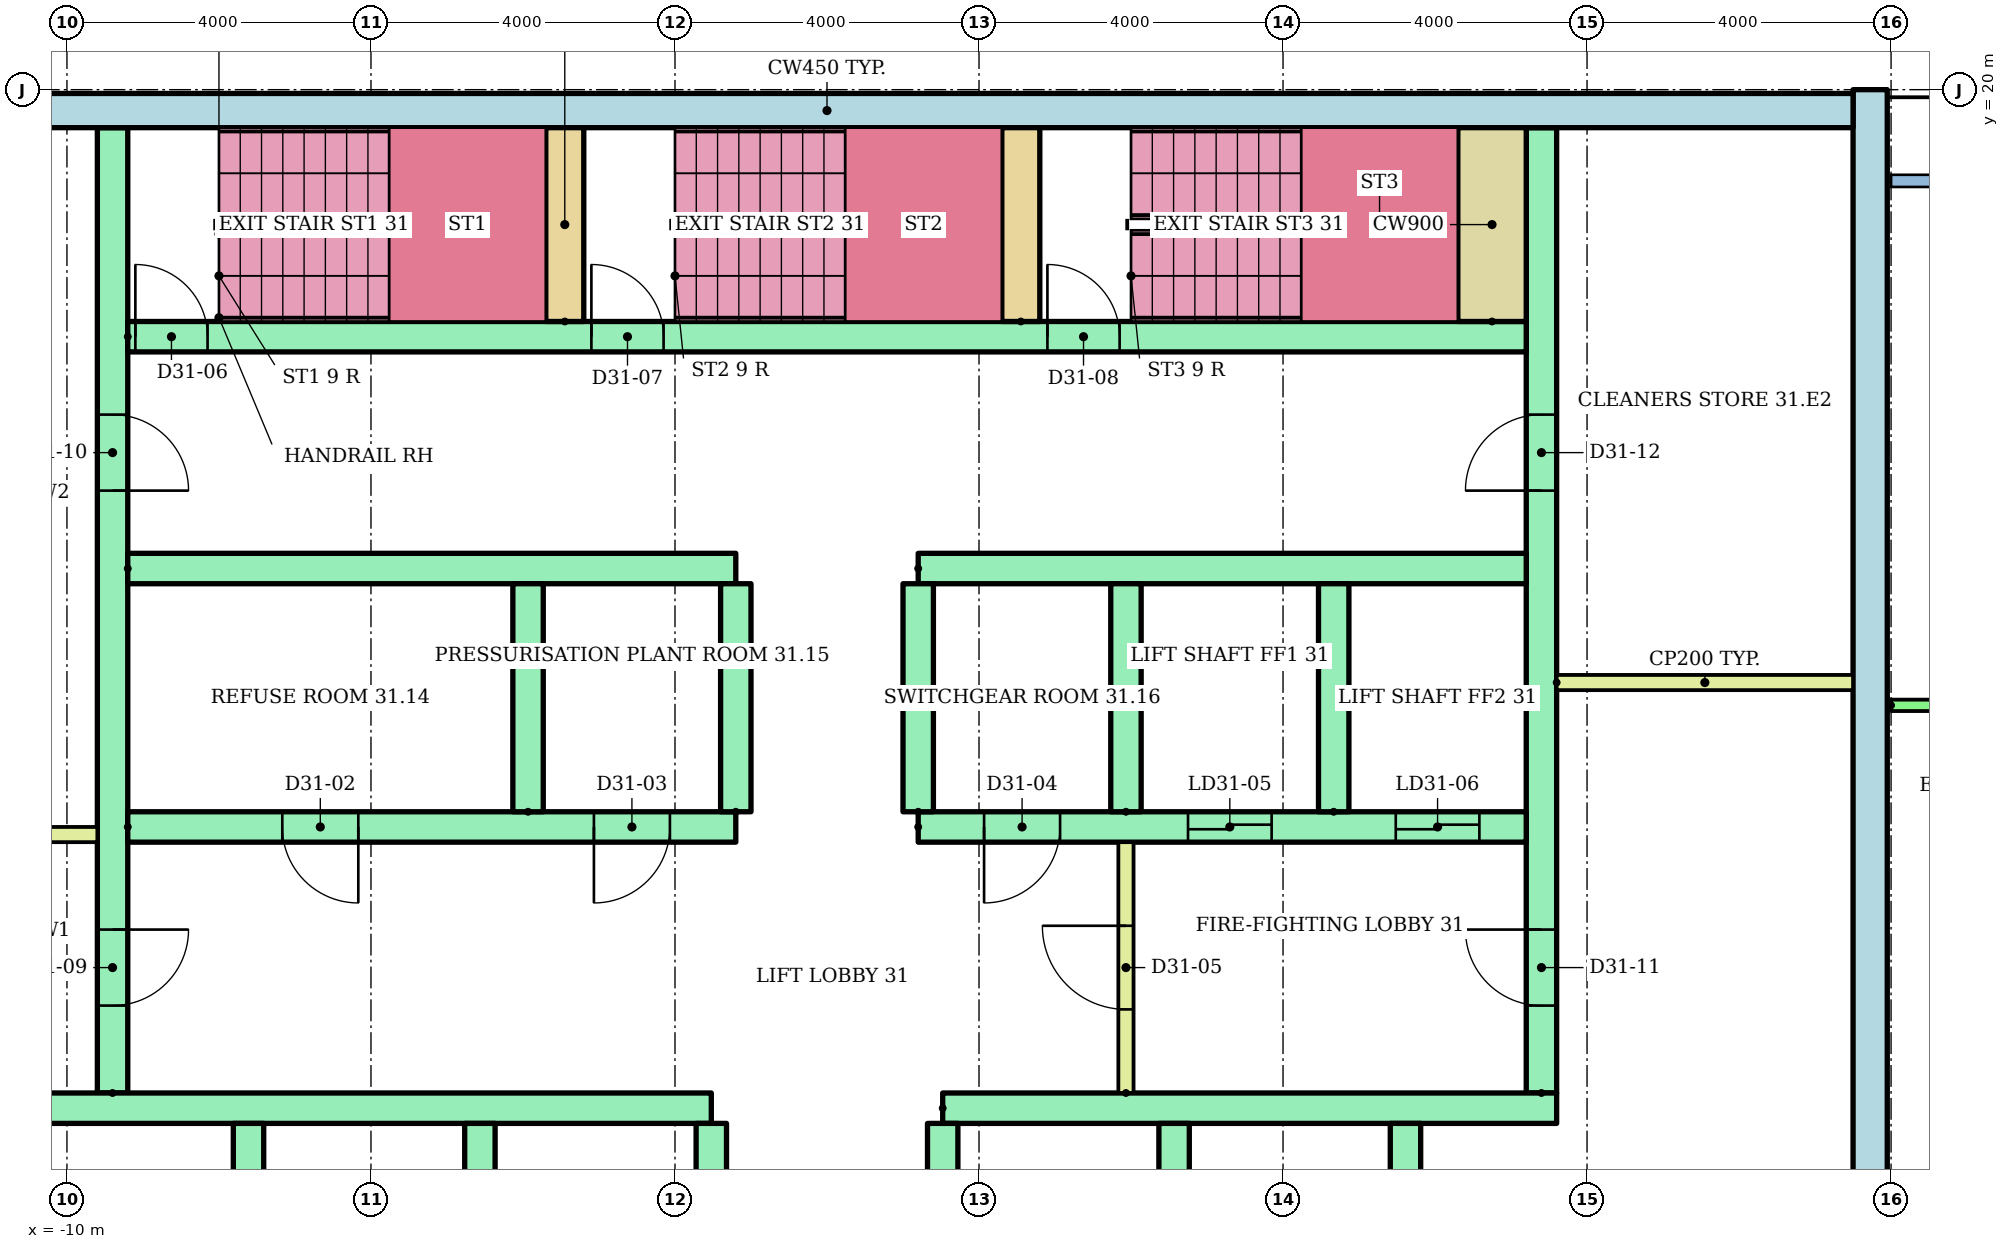
"""IFC4 building model, lengths in metres.
Left out: names, types, materials, properties, quantities, classifications, styles, units other than length and angle.
Written with IfcOpenShell. Run it as: python <this file> out.ifc"""

import sys

from ifc_helpers import new_model, si_unit, direction, frame, frame_2d, origin, place, context, subcontext, project, spatial, rectangle, extrude, element, fill, save


model = new_model("IFC4")
c1 = context("Model", 3, precision=1e-05, world=origin(), true_north=direction((0.0, 1.0)))
c2 = subcontext(c1, "Body", "Model", "MODEL_VIEW")
j1 = project(units=[si_unit("LENGTHUNIT", "METRE"), si_unit("PLANEANGLEUNIT", "RADIAN")], contexts=[c1])
p1 = place(None, origin())
s1 = spatial("IfcSite", under=j1, at=p1, CompositionType="ELEMENT")
p2 = place(p1, origin())
s2 = spatial("IfcBuilding", under=s1, at=p2, CompositionType="ELEMENT")
p3 = place(p2, frame((0.0, 0.0, 123.0)))
s3 = spatial("IfcBuildingStorey", under=s2, at=p3, CompositionType="ELEMENT", Elevation=123.0)
p4 = place(p3, frame((13.725, 3.0, 0.0), z_axis=(0.0, 0.0, 1.0), x_axis=(0.0, 1.0, 0.0)))
e1 = element("IfcWall", 1, at=p4, inside=s3, PredefinedType="SHEAR", context=c2, shape_type="SweptSolid", body=[
    extrude(rectangle(XDim=17.0, YDim=0.45, at=frame_2d((8.5, 0.0))), origin(), (0.0, 0.0, 1.0), 2.92),
])
p5 = place(p3, frame((-13.5, 19.725, 0.0)))
e2 = element("IfcWall", 2, at=p5, inside=s3, PredefinedType="SHEAR", context=c2, shape_type="SweptSolid", body=[
    extrude(rectangle(XDim=27.0, YDim=0.45, at=frame_2d((13.5, 0.0))), origin(), (0.0, 0.0, 1.0), 2.92),
])
p6 = place(p3, frame((-9.4, 6.8, 0.0), z_axis=(0.0, 0.0, 1.0), x_axis=(0.0, 1.0, 0.0)))
e3 = element("IfcWall", 3, at=p6, inside=s3, PredefinedType="SHEAR", context=c2, shape_type="SweptSolid", body=[
    extrude(rectangle(XDim=12.7, YDim=0.4, at=frame_2d((6.35, 0.0))), origin(), (0.0, 0.0, 1.0), 2.92),
])
p7 = place(p6, frame((1.15, 0.0, 0.0)))
e4 = element("IfcOpeningElement", 4, at=p7, cuts=e3, PredefinedType="OPENING", context=c2, shape_type="SweptSolid", body=[
    extrude(rectangle(XDim=1.0, YDim=2.1, at=frame_2d((0.5, 1.05))), frame((0.0, 0.21, 0.0), z_axis=(0.0, -1.0, 0.0), x_axis=(1.0, 0.0, 0.0)), (0.0, 0.0, 1.0), 0.42),
])
p8 = place(p6, frame((7.925, 0.0, 0.0)))
e5 = element("IfcOpeningElement", 5, at=p8, cuts=e3, PredefinedType="OPENING", context=c2, shape_type="SweptSolid", body=[
    extrude(rectangle(XDim=1.0, YDim=2.1, at=frame_2d((0.5, 1.05))), frame((0.0, 0.21, 0.0), z_axis=(0.0, -1.0, 0.0), x_axis=(1.0, 0.0, 0.0)), (0.0, 0.0, 1.0), 0.42),
])
p9 = place(p3, frame((9.4, 6.8, 0.0), z_axis=(0.0, 0.0, 1.0), x_axis=(0.0, 1.0, 0.0)))
e6 = element("IfcWall", 6, at=p9, inside=s3, PredefinedType="SHEAR", context=c2, shape_type="SweptSolid", body=[
    extrude(rectangle(XDim=12.7, YDim=0.4, at=frame_2d((6.35, 0.0))), origin(), (0.0, 0.0, 1.0), 2.92),
])
p10 = place(p9, frame((1.15, 0.0, 0.0)))
e7 = element("IfcOpeningElement", 7, at=p10, cuts=e6, PredefinedType="OPENING", context=c2, shape_type="SweptSolid", body=[
    extrude(rectangle(XDim=1.0, YDim=2.1, at=frame_2d((0.5, 1.05))), frame((0.0, 0.21, 0.0), z_axis=(0.0, -1.0, 0.0), x_axis=(1.0, 0.0, 0.0)), (0.0, 0.0, 1.0), 0.42),
])
p11 = place(p9, frame((7.925, 0.0, 0.0)))
e8 = element("IfcOpeningElement", 8, at=p11, cuts=e6, PredefinedType="OPENING", context=c2, shape_type="SweptSolid", body=[
    extrude(rectangle(XDim=1.0, YDim=2.1, at=frame_2d((0.5, 1.05))), frame((0.0, 0.21, 0.0), z_axis=(0.0, -1.0, 0.0), x_axis=(1.0, 0.0, 0.0)), (0.0, 0.0, 1.0), 0.42),
])
p12 = place(p3, frame((-13.5, 6.6, 0.0)))
e9 = element("IfcWall", 9, at=p12, inside=s3, PredefinedType="SHEAR", context=c2, shape_type="SweptSolid", body=[
    extrude(rectangle(XDim=11.978, YDim=0.4, at=frame_2d((5.989, 0.0))), origin(), (0.0, 0.0, 1.0), 2.92),
])
p13 = place(p3, frame((1.522, 6.6, 0.0)))
e10 = element("IfcWall", 10, at=p13, inside=s3, PredefinedType="SHEAR", context=c2, shape_type="SweptSolid", body=[
    extrude(rectangle(XDim=8.078, YDim=0.4, at=frame_2d((4.039, 0.0))), origin(), (0.0, 0.0, 1.0), 2.92),
])
for number, where, z_axis, x_axis in (
    (11, (-7.611, 3.4, 0.0), (0.0, 0.0, 1.0), (0.0, 1.0, 0.0)),
    (12, (-4.567, 3.4, 0.0), (0.0, 0.0, 1.0), (0.0, 1.0, 0.0)),
    (13, (-1.522, 3.4, 0.0), (0.0, 0.0, 1.0), (0.0, 1.0, 0.0)),
    (14, (1.522, 3.4, 0.0), (0.0, 0.0, 1.0), (0.0, 1.0, 0.0)),
    (15, (4.567, 3.4, 0.0), (0.0, 0.0, 1.0), (0.0, 1.0, 0.0)),
    (16, (7.611, 3.4, 0.0), (0.0, 0.0, 1.0), (0.0, 1.0, 0.0)),
):
    element("IfcWall", number, at=place(p3, frame(where, z_axis=z_axis, x_axis=x_axis)), inside=s3, PredefinedType="SHEAR", context=c2, shape_type="SweptSolid", body=[
        extrude(rectangle(XDim=3.0, YDim=0.4, at=frame_2d((1.5, 0.0))), origin(), (0.0, 0.0, 1.0), 2.92),
    ])
p14 = place(p3, frame((-9.2, 10.3, 0.0)))
e17 = element("IfcWall", 17, at=p14, inside=s3, PredefinedType="SHEAR", context=c2, shape_type="SweptSolid", body=[
    extrude(rectangle(XDim=8.0, YDim=0.4, at=frame_2d((4.0, 0.0))), origin(), (0.0, 0.0, 1.0), 2.92),
])
p15 = place(p14, frame((2.033, 0.0, 0.0)))
e18 = element("IfcOpeningElement", 18, at=p15, cuts=e17, PredefinedType="OPENING", context=c2, shape_type="SweptSolid", body=[
    extrude(rectangle(XDim=1.0, YDim=2.1, at=frame_2d((0.5, 1.05))), frame((0.0, 0.21, 0.0), z_axis=(0.0, -1.0, 0.0), x_axis=(1.0, 0.0, 0.0)), (0.0, 0.0, 1.0), 0.42),
])
p16 = place(p14, frame((6.133, 0.0, 0.0)))
e19 = element("IfcOpeningElement", 19, at=p16, cuts=e17, PredefinedType="OPENING", context=c2, shape_type="SweptSolid", body=[
    extrude(rectangle(XDim=1.0, YDim=2.1, at=frame_2d((0.5, 1.05))), frame((0.0, 0.21, 0.0), z_axis=(0.0, -1.0, 0.0), x_axis=(1.0, 0.0, 0.0)), (0.0, 0.0, 1.0), 0.42),
])
p17 = place(p3, frame((-9.2, 13.7, 0.0)))
e20 = element("IfcWall", 20, at=p17, inside=s3, PredefinedType="SHEAR", context=c2, shape_type="SweptSolid", body=[
    extrude(rectangle(XDim=8.0, YDim=0.4, at=frame_2d((4.0, 0.0))), origin(), (0.0, 0.0, 1.0), 2.92),
])
p18 = place(p3, frame((1.2, 10.3, 0.0)))
e21 = element("IfcWall", 21, at=p18, inside=s3, PredefinedType="SHEAR", context=c2, shape_type="SweptSolid", body=[
    extrude(rectangle(XDim=8.0, YDim=0.4, at=frame_2d((4.0, 0.0))), origin(), (0.0, 0.0, 1.0), 2.92),
])
p19 = place(p18, frame((3.55, 0.0, 0.0)))
e22 = element("IfcOpeningElement", 22, at=p19, cuts=e21, PredefinedType="OPENING", context=c2, shape_type="SweptSolid", body=[
    extrude(rectangle(XDim=1.1, YDim=2.1, at=frame_2d((0.55, 1.05))), frame((0.0, 0.21, 0.0), z_axis=(0.0, -1.0, 0.0), x_axis=(1.0, 0.0, 0.0)), (0.0, 0.0, 1.0), 0.42),
])
p20 = place(p18, frame((6.283, 0.0, 0.0)))
e23 = element("IfcOpeningElement", 23, at=p20, cuts=e21, PredefinedType="OPENING", context=c2, shape_type="SweptSolid", body=[
    extrude(rectangle(XDim=1.1, YDim=2.1, at=frame_2d((0.55, 1.05))), frame((0.0, 0.21, 0.0), z_axis=(0.0, -1.0, 0.0), x_axis=(1.0, 0.0, 0.0)), (0.0, 0.0, 1.0), 0.42),
])
p21 = place(p18, frame((0.867, 0.0, 0.0)))
e24 = element("IfcOpeningElement", 24, at=p21, cuts=e21, PredefinedType="OPENING", context=c2, shape_type="SweptSolid", body=[
    extrude(rectangle(XDim=1.0, YDim=2.1, at=frame_2d((0.5, 1.05))), frame((0.0, 0.21, 0.0), z_axis=(0.0, -1.0, 0.0), x_axis=(1.0, 0.0, 0.0)), (0.0, 0.0, 1.0), 0.42),
])
p22 = place(p3, frame((1.2, 13.7, 0.0)))
e25 = element("IfcWall", 25, at=p22, inside=s3, PredefinedType="SHEAR", context=c2, shape_type="SweptSolid", body=[
    extrude(rectangle(XDim=8.0, YDim=0.4, at=frame_2d((4.0, 0.0))), origin(), (0.0, 0.0, 1.0), 2.92),
])
for number, where, z_axis, x_axis in (
    (26, (-3.933, 10.5, 0.0), (0.0, 0.0, 1.0), (0.0, 1.0, 0.0)),
    (27, (-1.2, 10.5, 0.0), (0.0, 0.0, 1.0), (0.0, 1.0, 0.0)),
    (28, (1.2, 10.5, 0.0), (0.0, 0.0, 1.0), (0.0, 1.0, 0.0)),
    (29, (3.933, 10.5, 0.0), (0.0, 0.0, 1.0), (0.0, 1.0, 0.0)),
    (30, (6.667, 10.5, 0.0), (0.0, 0.0, 1.0), (0.0, 1.0, 0.0)),
):
    element("IfcWall", number, at=place(p3, frame(where, z_axis=z_axis, x_axis=x_axis)), inside=s3, PredefinedType="SHEAR", context=c2, shape_type="SweptSolid", body=[
        extrude(rectangle(XDim=3.0, YDim=0.4, at=frame_2d((1.5, 0.0))), origin(), (0.0, 0.0, 1.0), 2.92),
    ])
p23 = place(p3, frame((3.933, 6.8, 0.0), z_axis=(0.0, 0.0, 1.0), x_axis=(0.0, 1.0, 0.0)))
e31 = element("IfcWall", 31, at=p23, inside=s3, PredefinedType="PARTITIONING", context=c2, shape_type="SweptSolid", body=[
    extrude(rectangle(XDim=3.3, YDim=0.2, at=frame_2d((1.65, 0.0))), origin(), (0.0, 0.0, 1.0), 2.92),
])
p24 = place(p23, frame((1.1, 0.0, 0.0)))
e32 = element("IfcOpeningElement", 32, at=p24, cuts=e31, PredefinedType="OPENING", context=c2, shape_type="SweptSolid", body=[
    extrude(rectangle(XDim=1.1, YDim=2.1, at=frame_2d((0.55, 1.05))), frame((0.0, 0.11, 0.0), z_axis=(0.0, -1.0, 0.0), x_axis=(1.0, 0.0, 0.0)), (0.0, 0.0, 1.0), 0.22),
])
p25 = place(p3, frame((-9.2, 16.75, 0.0)))
e33 = element("IfcWall", 33, at=p25, inside=s3, PredefinedType="SHEAR", context=c2, shape_type="SweptSolid", body=[
    extrude(rectangle(XDim=18.4, YDim=0.4, at=frame_2d((9.2, 0.0))), origin(), (0.0, 0.0, 1.0), 2.92),
])
p26 = place(p25, frame((0.1, 0.0, 0.0)))
e34 = element("IfcOpeningElement", 34, at=p26, cuts=e33, PredefinedType="OPENING", context=c2, shape_type="SweptSolid", body=[
    extrude(rectangle(XDim=0.95, YDim=2.1, at=frame_2d((0.475, 1.05))), frame((0.0, 0.21, 0.0), z_axis=(0.0, -1.0, 0.0), x_axis=(1.0, 0.0, 0.0)), (0.0, 0.0, 1.0), 0.42),
])
p27 = place(p25, frame((6.1, 0.0, 0.0)))
e35 = element("IfcOpeningElement", 35, at=p27, cuts=e33, PredefinedType="OPENING", context=c2, shape_type="SweptSolid", body=[
    extrude(rectangle(XDim=0.95, YDim=2.1, at=frame_2d((0.475, 1.05))), frame((0.0, 0.21, 0.0), z_axis=(0.0, -1.0, 0.0), x_axis=(1.0, 0.0, 0.0)), (0.0, 0.0, 1.0), 0.42),
])
p28 = place(p25, frame((12.1, 0.0, 0.0)))
e36 = element("IfcOpeningElement", 36, at=p28, cuts=e33, PredefinedType="OPENING", context=c2, shape_type="SweptSolid", body=[
    extrude(rectangle(XDim=0.95, YDim=2.1, at=frame_2d((0.475, 1.05))), frame((0.0, 0.21, 0.0), z_axis=(0.0, -1.0, 0.0), x_axis=(1.0, 0.0, 0.0)), (0.0, 0.0, 1.0), 0.42),
])
for number, where, z_axis, x_axis in (
    (37, (-3.45, 16.95, 0.0), (0.0, 0.0, 1.0), (0.0, 1.0, 0.0)),
    (38, (2.55, 16.95, 0.0), (0.0, 0.0, 1.0), (0.0, 1.0, 0.0)),
):
    element("IfcWall", number, at=place(p3, frame(where, z_axis=z_axis, x_axis=x_axis)), inside=s3, PredefinedType="SHEAR", context=c2, shape_type="SweptSolid", body=[
        extrude(rectangle(XDim=2.55, YDim=0.5, at=frame_2d((1.275, 0.0))), origin(), (0.0, 0.0, 1.0), 2.92),
    ])
p29 = place(p3, frame((8.75, 16.95, 0.0), z_axis=(0.0, 0.0, 1.0), x_axis=(0.0, 1.0, 0.0)))
e39 = element("IfcWall", 39, at=p29, inside=s3, PredefinedType="SHEAR", context=c2, shape_type="SweptSolid", body=[
    extrude(rectangle(XDim=2.55, YDim=0.9, at=frame_2d((1.275, 0.0))), origin(), (0.0, 0.0, 1.0), 2.92),
])
for number, where in (
    (40, (-13.5, 10.2, 0.0)),
    (41, (9.6, 12.2, 0.0)),
):
    element("IfcWall", number, at=place(p3, frame(where)), inside=s3, PredefinedType="PARTITIONING", context=c2, shape_type="SweptSolid", body=[
        extrude(rectangle(XDim=3.9, YDim=0.2, at=frame_2d((1.95, 0.0))), origin(), (0.0, 0.0, 1.0), 2.92),
    ])
p30 = place(p3, frame((14.0, 11.9, 0.0)))
e42 = element("IfcWall", 42, at=p30, inside=s3, PredefinedType="PARTITIONING", context=c2, shape_type="SweptSolid", body=[
    extrude(rectangle(XDim=18.72, YDim=0.15, at=frame_2d((9.36, 0.0))), origin(), (0.0, 0.0, 1.0), 2.4),
])
p31 = place(p30, frame((1.5, 0.0, 0.0)))
e43 = element("IfcOpeningElement", 43, at=p31, cuts=e42, PredefinedType="OPENING", context=c2, shape_type="SweptSolid", body=[
    extrude(rectangle(XDim=1.0, YDim=2.1, at=frame_2d((0.5, 1.05))), frame((0.0, 0.085, 0.0), z_axis=(0.0, -1.0, 0.0), x_axis=(1.0, 0.0, 0.0)), (0.0, 0.0, 1.0), 0.17),
])
p32 = place(p30, frame((7.55, 0.0, 0.0)))
e44 = element("IfcOpeningElement", 44, at=p32, cuts=e42, PredefinedType="OPENING", context=c2, shape_type="SweptSolid", body=[
    extrude(rectangle(XDim=0.9, YDim=2.1, at=frame_2d((0.45, 1.05))), frame((0.0, 0.085, 0.0), z_axis=(0.0, -1.0, 0.0), x_axis=(1.0, 0.0, 0.0)), (0.0, 0.0, 1.0), 0.17),
])
p33 = place(p30, frame((14.8, 0.0, 0.0)))
e45 = element("IfcOpeningElement", 45, at=p33, cuts=e42, PredefinedType="OPENING", context=c2, shape_type="SweptSolid", body=[
    extrude(rectangle(XDim=0.9, YDim=2.1, at=frame_2d((0.45, 1.05))), frame((0.0, 0.085, 0.0), z_axis=(0.0, -1.0, 0.0), x_axis=(1.0, 0.0, 0.0)), (0.0, 0.0, 1.0), 0.17),
])
p34 = place(p19, origin())
e46 = element("IfcDoor", 46, at=p34, inside=s3, OperationType="SLIDING_TO_LEFT", PredefinedType="DOOR", context=c2, shape_type="SweptSolid", body=[
    extrude(rectangle(XDim=1.1, YDim=2.1, at=frame_2d((0.55, 1.05))), frame((0.0, 0.025, 0.0), z_axis=(0.0, -1.0, 0.0), x_axis=(1.0, 0.0, 0.0)), (0.0, 0.0, 1.0), 0.05),
])
fill(e22, e46)
p35 = place(p20, origin())
e47 = element("IfcDoor", 47, at=p35, inside=s3, OperationType="SLIDING_TO_LEFT", PredefinedType="DOOR", context=c2, shape_type="SweptSolid", body=[
    extrude(rectangle(XDim=1.1, YDim=2.1, at=frame_2d((0.55, 1.05))), frame((0.0, 0.025, 0.0), z_axis=(0.0, -1.0, 0.0), x_axis=(1.0, 0.0, 0.0)), (0.0, 0.0, 1.0), 0.05),
])
fill(e23, e47)
p36 = place(p15, frame((1.0, 0.0, 0.0), z_axis=(0.0, 0.0, 1.0), x_axis=(-1.0, 0.0, 0.0)))
e48 = element("IfcDoor", 48, at=p36, inside=s3, OperationType="SINGLE_SWING_RIGHT", PredefinedType="DOOR", context=c2, shape_type="SweptSolid", body=[
    extrude(rectangle(XDim=1.0, YDim=2.1, at=frame_2d((0.5, 1.05))), frame((0.0, 0.025, 0.0), z_axis=(0.0, -1.0, 0.0), x_axis=(1.0, 0.0, 0.0)), (0.0, 0.0, 1.0), 0.05),
])
fill(e18, e48)
p37 = place(p16, frame((1.0, 0.0, 0.0), z_axis=(0.0, 0.0, 1.0), x_axis=(-1.0, 0.0, 0.0)))
e49 = element("IfcDoor", 49, at=p37, inside=s3, OperationType="SINGLE_SWING_LEFT", PredefinedType="DOOR", context=c2, shape_type="SweptSolid", body=[
    extrude(rectangle(XDim=1.0, YDim=2.1, at=frame_2d((0.5, 1.05))), frame((0.0, 0.025, 0.0), z_axis=(0.0, -1.0, 0.0), x_axis=(1.0, 0.0, 0.0)), (0.0, 0.0, 1.0), 0.05),
])
fill(e19, e49)
p38 = place(p21, frame((1.0, 0.0, 0.0), z_axis=(0.0, 0.0, 1.0), x_axis=(-1.0, 0.0, 0.0)))
e50 = element("IfcDoor", 50, at=p38, inside=s3, OperationType="SINGLE_SWING_LEFT", PredefinedType="DOOR", context=c2, shape_type="SweptSolid", body=[
    extrude(rectangle(XDim=1.0, YDim=2.1, at=frame_2d((0.5, 1.05))), frame((0.0, 0.025, 0.0), z_axis=(0.0, -1.0, 0.0), x_axis=(1.0, 0.0, 0.0)), (0.0, 0.0, 1.0), 0.05),
])
fill(e24, e50)
p39 = place(p24, origin())
e51 = element("IfcDoor", 51, at=p39, inside=s3, OperationType="SINGLE_SWING_RIGHT", PredefinedType="DOOR", context=c2, shape_type="SweptSolid", body=[
    extrude(rectangle(XDim=1.1, YDim=2.1, at=frame_2d((0.55, 1.05))), frame((0.0, 0.025, 0.0), z_axis=(0.0, -1.0, 0.0), x_axis=(1.0, 0.0, 0.0)), (0.0, 0.0, 1.0), 0.05),
])
fill(e32, e51)
p40 = place(p26, origin())
e52 = element("IfcDoor", 52, at=p40, inside=s3, OperationType="SINGLE_SWING_LEFT", PredefinedType="DOOR", context=c2, shape_type="SweptSolid", body=[
    extrude(rectangle(XDim=0.95, YDim=2.1, at=frame_2d((0.475, 1.05))), frame((0.0, 0.025, 0.0), z_axis=(0.0, -1.0, 0.0), x_axis=(1.0, 0.0, 0.0)), (0.0, 0.0, 1.0), 0.05),
])
fill(e34, e52)
p41 = place(p27, origin())
e53 = element("IfcDoor", 53, at=p41, inside=s3, OperationType="SINGLE_SWING_LEFT", PredefinedType="DOOR", context=c2, shape_type="SweptSolid", body=[
    extrude(rectangle(XDim=0.95, YDim=2.1, at=frame_2d((0.475, 1.05))), frame((0.0, 0.025, 0.0), z_axis=(0.0, -1.0, 0.0), x_axis=(1.0, 0.0, 0.0)), (0.0, 0.0, 1.0), 0.05),
])
fill(e35, e53)
p42 = place(p28, origin())
e54 = element("IfcDoor", 54, at=p42, inside=s3, OperationType="SINGLE_SWING_LEFT", PredefinedType="DOOR", context=c2, shape_type="SweptSolid", body=[
    extrude(rectangle(XDim=0.95, YDim=2.1, at=frame_2d((0.475, 1.05))), frame((0.0, 0.025, 0.0), z_axis=(0.0, -1.0, 0.0), x_axis=(1.0, 0.0, 0.0)), (0.0, 0.0, 1.0), 0.05),
])
fill(e36, e54)
p43 = place(p7, frame((1.0, 0.0, 0.0), z_axis=(0.0, 0.0, 1.0), x_axis=(-1.0, 0.0, 0.0)))
e55 = element("IfcDoor", 55, at=p43, inside=s3, OperationType="SINGLE_SWING_RIGHT", PredefinedType="DOOR", context=c2, shape_type="SweptSolid", body=[
    extrude(rectangle(XDim=1.0, YDim=2.1, at=frame_2d((0.5, 1.05))), frame((0.0, 0.025, 0.0), z_axis=(0.0, -1.0, 0.0), x_axis=(1.0, 0.0, 0.0)), (0.0, 0.0, 1.0), 0.05),
])
fill(e4, e55)
p44 = place(p8, frame((1.0, 0.0, 0.0), z_axis=(0.0, 0.0, 1.0), x_axis=(-1.0, 0.0, 0.0)))
e56 = element("IfcDoor", 56, at=p44, inside=s3, OperationType="SINGLE_SWING_LEFT", PredefinedType="DOOR", context=c2, shape_type="SweptSolid", body=[
    extrude(rectangle(XDim=1.0, YDim=2.1, at=frame_2d((0.5, 1.05))), frame((0.0, 0.025, 0.0), z_axis=(0.0, -1.0, 0.0), x_axis=(1.0, 0.0, 0.0)), (0.0, 0.0, 1.0), 0.05),
])
fill(e5, e56)
p45 = place(p10, origin())
e57 = element("IfcDoor", 57, at=p45, inside=s3, OperationType="SINGLE_SWING_RIGHT", PredefinedType="DOOR", context=c2, shape_type="SweptSolid", body=[
    extrude(rectangle(XDim=1.0, YDim=2.1, at=frame_2d((0.5, 1.05))), frame((0.0, 0.025, 0.0), z_axis=(0.0, -1.0, 0.0), x_axis=(1.0, 0.0, 0.0)), (0.0, 0.0, 1.0), 0.05),
])
fill(e7, e57)
p46 = place(p11, origin())
e58 = element("IfcDoor", 58, at=p46, inside=s3, OperationType="SINGLE_SWING_LEFT", PredefinedType="DOOR", context=c2, shape_type="SweptSolid", body=[
    extrude(rectangle(XDim=1.0, YDim=2.1, at=frame_2d((0.5, 1.05))), frame((0.0, 0.025, 0.0), z_axis=(0.0, -1.0, 0.0), x_axis=(1.0, 0.0, 0.0)), (0.0, 0.0, 1.0), 0.05),
])
fill(e8, e58)
save(model, sys.argv[1])
